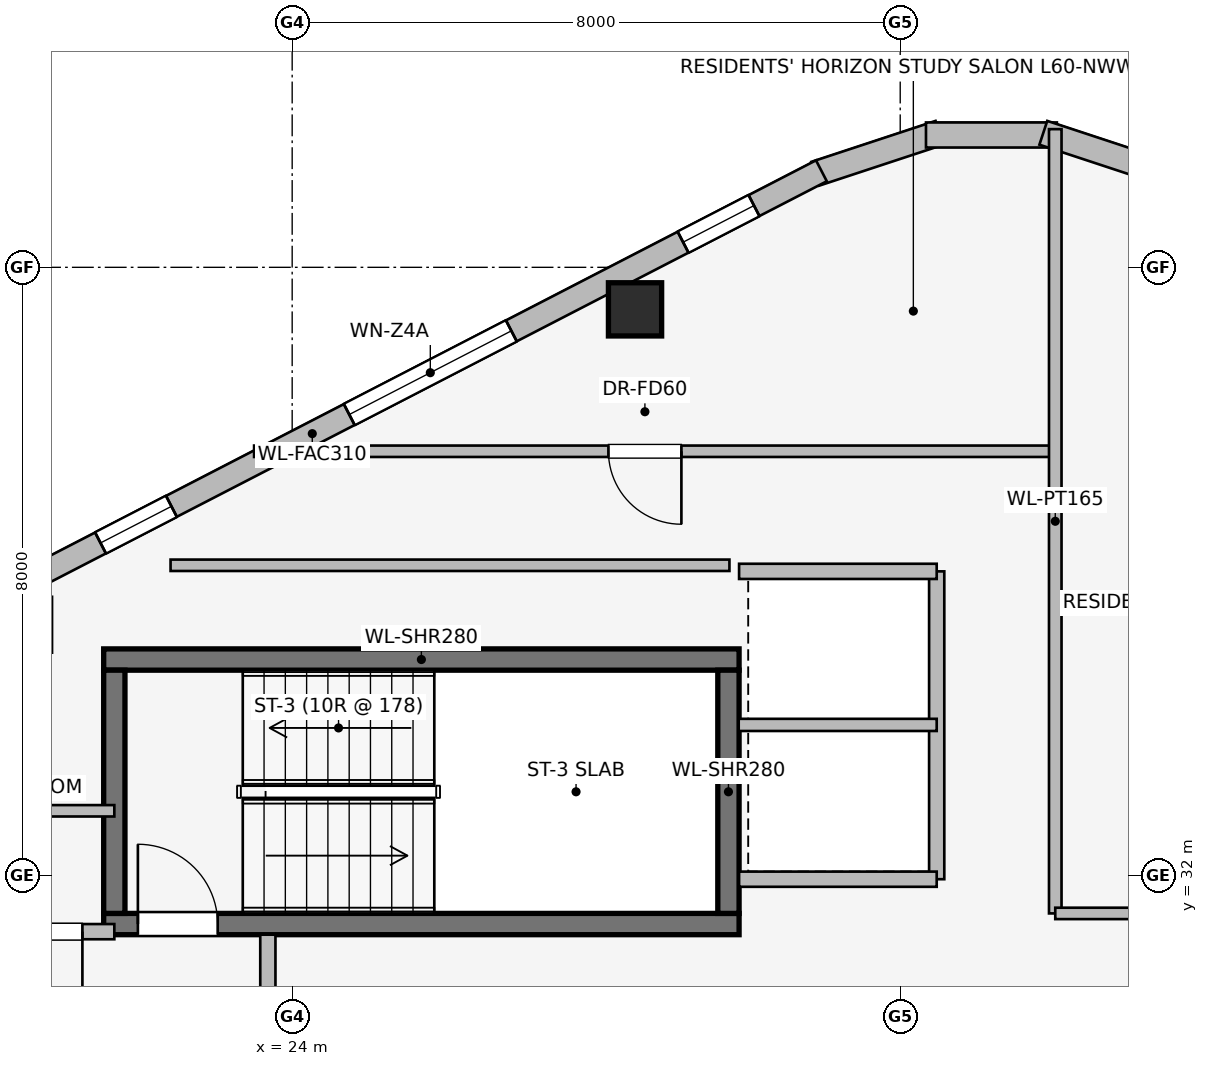
"""IFC4 building model, lengths in metres.
Left out: names, types, materials, properties, quantities, classifications, styles, units other than length and angle.
Written with IfcOpenShell. Run it as: python <this file> out.ifc"""

import sys

from ifc_helpers import new_model, si_unit, direction, frame, frame_2d, origin, origin_2d, place, context, subcontext, project, spatial, rectangle, extrude, element, fill, save


model = new_model("IFC4")
c1 = context("Model", 3, precision=1e-05, world=origin(), true_north=direction((0.0, 1.0)))
c2 = subcontext(c1, "Body", "Model", "MODEL_VIEW")
j1 = project(units=[si_unit("LENGTHUNIT", "METRE"), si_unit("PLANEANGLEUNIT", "RADIAN")], contexts=[c1])
p1 = place(None, origin())
s1 = spatial("IfcSite", under=j1, at=p1, CompositionType="ELEMENT")
p2 = place(p1, origin())
s2 = spatial("IfcBuilding", under=s1, at=p2, CompositionType="ELEMENT")
p3 = place(p2, frame((0.0, 0.0, 220.6)))
s3 = spatial("IfcBuildingStorey", under=s2, at=p3, CompositionType="ELEMENT", Elevation=220.6)
p4 = place(p3, frame((21.52, 31.36, 0.0), z_axis=(0.0, 0.0, 1.0), x_axis=(1.0, 0.0, 0.0)))
e1 = element("IfcWall", 1, at=p4, inside=s3, PredefinedType="SHEAR", context=c2, shape_type="SweptSolid", body=[
    extrude(rectangle(XDim=8.36, YDim=0.28, at=frame_2d((4.18, 0.0))), origin(), (0.0, 0.0, 1.0), 3.55),
])
p5 = place(p4, frame((0.45, 0.0, 0.0)))
e2 = element("IfcOpeningElement", 2, at=p5, cuts=e1, PredefinedType="OPENING", context=c2, shape_type="SweptSolid", body=[
    extrude(rectangle(XDim=1.05, YDim=2.0, at=frame_2d((0.525, 1.0))), frame((0.0, 0.15, 0.0), z_axis=(0.0, -1.0, 0.0), x_axis=(1.0, 0.0, 0.0)), (0.0, 0.0, 1.0), 0.3),
])
p6 = place(p3, frame((29.88, 34.84, 0.0), z_axis=(0.0, 0.0, 1.0), x_axis=(-1.0, 0.0, 0.0)))
e3 = element("IfcWall", 3, at=p6, inside=s3, PredefinedType="SHEAR", context=c2, shape_type="SweptSolid", body=[
    extrude(rectangle(XDim=8.36, YDim=0.28, at=frame_2d((4.18, 0.0))), origin(), (0.0, 0.0, 1.0), 3.55),
])
for number, where, z_axis, x_axis in (
    (4, (21.66, 34.7, 0.0), (0.0, 0.0, 1.0), (0.0, -1.0, 0.0)),
    (5, (29.74, 31.5, 0.0), (0.0, 0.0, 1.0), (0.0, 1.0, 0.0)),
):
    element("IfcWall", number, at=place(p3, frame(where, z_axis=z_axis, x_axis=x_axis)), inside=s3, PredefinedType="SHEAR", context=c2, shape_type="SweptSolid", body=[
        extrude(rectangle(XDim=3.2, YDim=0.28, at=frame_2d((1.6, 0.0))), origin(), (0.0, 0.0, 1.0), 3.55),
    ])
p7 = place(p3, frame((28.511, 39.447, 0.0), z_axis=(0.0, 0.0, 1.0), x_axis=(1.0, 0.0, 0.0)))
e6 = element("IfcColumn", 6, at=p7, inside=s3, PredefinedType="COLUMN", context=c2, shape_type="SweptSolid", body=[
    extrude(rectangle(XDim=0.7, YDim=0.7, at=origin_2d()), origin(), (0.0, 0.0, 1.0), 3.55),
])
p8 = place(p3, frame((30.882, 41.231, 0.0), z_axis=(0.0, 0.0, 1.0), x_axis=(0.949713440491, 0.313120393699, 0.0)))
e7 = element("IfcWall", 7, at=p8, inside=s3, PredefinedType="STANDARD", context=c2, shape_type="SweptSolid", body=[
    extrude(rectangle(XDim=1.722, YDim=0.33, at=frame_2d((0.861, 0.0))), origin(), (0.0, 0.0, 1.0), 3.29),
])
p9 = place(p3, frame((32.339, 41.741, 0.0), z_axis=(0.0, 0.0, 1.0), x_axis=(1.0, 0.0, 0.0)))
e8 = element("IfcWall", 8, at=p9, inside=s3, PredefinedType="STANDARD", context=c2, shape_type="SweptSolid", body=[
    extrude(rectangle(XDim=1.722, YDim=0.33, at=frame_2d((0.861, 0.0))), origin(), (0.0, 0.0, 1.0), 3.29),
])
p10 = place(p3, frame((33.883, 41.77, 0.0), z_axis=(0.0, 0.0, 1.0), x_axis=(0.949713440491, -0.313120393699, 0.0)))
e9 = element("IfcWall", 9, at=p10, inside=s3, PredefinedType="STANDARD", context=c2, shape_type="SweptSolid", body=[
    extrude(rectangle(XDim=1.722, YDim=0.33, at=frame_2d((0.861, 0.0))), origin(), (0.0, 0.0, 1.0), 3.29),
])
p11 = place(p3, frame((17.566, 34.354, 0.0), z_axis=(0.0, 0.0, 1.0), x_axis=(0.888581481622, 0.458718814218, 0.0)))
e10 = element("IfcWall", 10, at=p11, inside=s3, PredefinedType="STANDARD", context=c2, shape_type="SweptSolid", body=[
    extrude(rectangle(XDim=15.077, YDim=0.31, at=frame_2d((7.539, 0.0))), origin(), (0.0, 0.0, 1.0), 3.29),
])
p12 = place(p11, frame((0.998, 0.0, 0.75)))
e11 = element("IfcOpeningElement", 11, at=p12, cuts=e10, PredefinedType="OPENING", context=c2, shape_type="SweptSolid", body=[
    extrude(rectangle(XDim=1.05, YDim=1.4, at=frame_2d((0.525, 0.7))), frame((0.0, 0.165, 0.0), z_axis=(0.0, -1.0, 0.0), x_axis=(1.0, 0.0, 0.0)), (0.0, 0.0, 1.0), 0.33),
])
p13 = place(p11, frame((4.403, 0.0, 0.75)))
e12 = element("IfcOpeningElement", 12, at=p13, cuts=e10, PredefinedType="OPENING", context=c2, shape_type="SweptSolid", body=[
    extrude(rectangle(XDim=1.05, YDim=1.4, at=frame_2d((0.525, 0.7))), frame((0.0, 0.165, 0.0), z_axis=(0.0, -1.0, 0.0), x_axis=(1.0, 0.0, 0.0)), (0.0, 0.0, 1.0), 0.33),
])
p14 = place(p11, frame((8.086, 0.0, 0.75)))
e13 = element("IfcOpeningElement", 13, at=p14, cuts=e10, PredefinedType="OPENING", context=c2, shape_type="SweptSolid", body=[
    extrude(rectangle(XDim=2.4, YDim=1.6, at=frame_2d((1.2, 0.8))), frame((0.0, 0.165, 0.0), z_axis=(0.0, -1.0, 0.0), x_axis=(1.0, 0.0, 0.0)), (0.0, 0.0, 1.0), 0.33),
])
p15 = place(p11, frame((13.029, 0.0, 0.75)))
e14 = element("IfcOpeningElement", 14, at=p15, cuts=e10, PredefinedType="OPENING", context=c2, shape_type="SweptSolid", body=[
    extrude(rectangle(XDim=1.05, YDim=1.4, at=frame_2d((0.525, 0.7))), frame((0.0, 0.165, 0.0), z_axis=(0.0, -1.0, 0.0), x_axis=(1.0, 0.0, 0.0)), (0.0, 0.0, 1.0), 0.33),
])
p16 = place(p3, frame((23.68, 25.68, 0.0), z_axis=(0.0, 0.0, 1.0), x_axis=(0.0, 1.0, 0.0)))
e15 = element("IfcWall", 15, at=p16, inside=s3, PredefinedType="PARTITIONING", context=c2, shape_type="SweptSolid", body=[
    extrude(rectangle(XDim=5.54, YDim=0.2, at=frame_2d((2.77, 0.0))), origin(), (0.0, 0.0, 1.0), 3.29),
])
p17 = place(p16, frame((1.8, 0.0, 0.0)))
e16 = element("IfcOpeningElement", 16, at=p17, cuts=e15, PredefinedType="OPENING", context=c2, shape_type="SweptSolid", body=[
    extrude(rectangle(XDim=1.05, YDim=2.0, at=frame_2d((0.525, 1.0))), frame((0.0, 0.11, 0.0), z_axis=(0.0, -1.0, 0.0), x_axis=(1.0, 0.0, 0.0)), (0.0, 0.0, 1.0), 0.22),
])
p18 = place(p3, frame((21.66, 31.26, 0.0), z_axis=(0.0, 0.0, 1.0), x_axis=(-1.0, 0.0, 0.0)))
e17 = element("IfcWall", 17, at=p18, inside=s3, PredefinedType="PARTITIONING", context=c2, shape_type="SweptSolid", body=[
    extrude(rectangle(XDim=2.01, YDim=0.2, at=frame_2d((1.005, 0.0))), origin(), (0.0, 0.0, 1.0), 3.29),
])
p19 = place(p18, frame((0.42, 0.0, 0.0)))
e18 = element("IfcOpeningElement", 18, at=p19, cuts=e17, PredefinedType="OPENING", context=c2, shape_type="SweptSolid", body=[
    extrude(rectangle(XDim=0.86, YDim=2.0, at=frame_2d((0.43, 1.0))), frame((0.0, 0.11, 0.0), z_axis=(0.0, -1.0, 0.0), x_axis=(1.0, 0.0, 0.0)), (0.0, 0.0, 1.0), 0.22),
])
p20 = place(p3, frame((32.48, 31.95, 0.0), z_axis=(0.0, 0.0, 1.0), x_axis=(0.0, 1.0, 0.0)))
e19 = element("IfcWall", 19, at=p20, inside=s3, PredefinedType="PARTITIONING", context=c2, shape_type="SweptSolid", body=[
    extrude(rectangle(XDim=4.05, YDim=0.2, at=frame_2d((2.025, 0.0))), origin(), (0.0, 0.0, 1.0), 3.29),
])
p21 = place(p3, frame((29.88, 36.0, 0.0), z_axis=(0.0, 0.0, 1.0), x_axis=(1.0, 0.0, 0.0)))
e20 = element("IfcWall", 20, at=p21, inside=s3, PredefinedType="PARTITIONING", context=c2, shape_type="SweptSolid", body=[
    extrude(rectangle(XDim=2.6, YDim=0.2, at=frame_2d((1.3, 0.0))), origin(), (0.0, 0.0, 1.0), 3.29),
])
p22 = place(p3, frame((32.48, 31.95, 0.0), z_axis=(0.0, 0.0, 1.0), x_axis=(-1.0, 0.0, 0.0)))
e21 = element("IfcWall", 21, at=p22, inside=s3, PredefinedType="PARTITIONING", context=c2, shape_type="SweptSolid", body=[
    extrude(rectangle(XDim=2.6, YDim=0.2, at=frame_2d((1.3, 0.0))), origin(), (0.0, 0.0, 1.0), 2.682),
])
p23 = place(p3, frame((29.875, 33.98, 0.0), z_axis=(0.0, 0.0, 1.0), x_axis=(1.0, 0.0, 0.0)))
e22 = element("IfcWall", 22, at=p23, inside=s3, PredefinedType="PARTITIONING", context=c2, shape_type="SweptSolid", body=[
    extrude(rectangle(XDim=2.605, YDim=0.16, at=frame_2d((1.302, 0.0))), origin(), (0.0, 0.0, 1.0), 3.29),
])
p24 = place(p3, frame((21.66, 32.85, 0.0), z_axis=(0.0, 0.0, 1.0), x_axis=(-1.0, 0.0, 0.0)))
e23 = element("IfcWall", 23, at=p24, inside=s3, PredefinedType="PARTITIONING", context=c2, shape_type="SweptSolid", body=[
    extrude(rectangle(XDim=1.71, YDim=0.15, at=frame_2d((0.855, 0.0))), origin(), (0.0, 0.0, 1.0), 3.29),
])
p25 = place(p3, frame((34.0, 37.58, 0.0), z_axis=(0.0, 0.0, 1.0), x_axis=(-1.0, 0.0, 0.0)))
e24 = element("IfcWall", 24, at=p25, inside=s3, PredefinedType="PARTITIONING", context=c2, shape_type="SweptSolid", body=[
    extrude(rectangle(XDim=10.501, YDim=0.15, at=frame_2d((5.25, 0.0))), origin(), (0.0, 0.0, 1.0), 3.29),
])
p26 = place(p25, frame((4.879, 0.0, 0.0)))
e25 = element("IfcOpeningElement", 25, at=p26, cuts=e24, PredefinedType="OPENING", context=c2, shape_type="SweptSolid", body=[
    extrude(rectangle(XDim=0.96, YDim=2.0, at=frame_2d((0.48, 1.0))), frame((0.0, 0.085, 0.0), z_axis=(0.0, -1.0, 0.0), x_axis=(1.0, 0.0, 0.0)), (0.0, 0.0, 1.0), 0.17),
])
p27 = place(p3, frame((34.04, 31.5, 0.0), z_axis=(0.0, 0.0, 1.0), x_axis=(0.0, 1.0, 0.0)))
e26 = element("IfcWall", 26, at=p27, inside=s3, PredefinedType="PARTITIONING", context=c2, shape_type="SweptSolid", body=[
    extrude(rectangle(XDim=10.318, YDim=0.165, at=frame_2d((5.159, 0.0))), origin(), (0.0, 0.0, 1.0), 3.29),
])
p28 = place(p3, frame((41.46, 31.5, 0.0), z_axis=(0.0, 0.0, 1.0), x_axis=(-1.0, 0.0, 0.0)))
e27 = element("IfcWall", 27, at=p28, inside=s3, PredefinedType="PARTITIONING", context=c2, shape_type="SweptSolid", body=[
    extrude(rectangle(XDim=7.42, YDim=0.15, at=frame_2d((3.71, 0.0))), origin(), (0.0, 0.0, 1.0), 3.29),
])
p29 = place(p28, frame((3.23, 0.0, 0.0)))
e28 = element("IfcOpeningElement", 28, at=p29, cuts=e27, PredefinedType="OPENING", context=c2, shape_type="SweptSolid", body=[
    extrude(rectangle(XDim=0.96, YDim=2.0, at=frame_2d((0.48, 1.0))), frame((0.0, 0.085, 0.0), z_axis=(0.0, -1.0, 0.0), x_axis=(1.0, 0.0, 0.0)), (0.0, 0.0, 1.0), 0.17),
])
p30 = place(p3, frame((29.753, 36.08, 0.0), z_axis=(0.0, 0.0, 1.0), x_axis=(-1.0, 0.0, 0.0)))
e29 = element("IfcWall", 29, at=p30, inside=s3, PredefinedType="PARTITIONING", context=c2, shape_type="SweptSolid", body=[
    extrude(rectangle(XDim=7.353, YDim=0.15, at=frame_2d((3.677, 0.0))), origin(), (0.0, 0.0, 1.0), 3.29),
])
p31 = place(p13, origin())
e30 = element("IfcWindow", 30, at=p31, inside=s3, PartitioningType="SINGLE_PANEL", PredefinedType="WINDOW", context=c2, shape_type="SweptSolid", body=[
    extrude(rectangle(XDim=1.05, YDim=1.4, at=frame_2d((0.525, 0.7))), frame((0.0, 0.03, 0.0), z_axis=(0.0, -1.0, 0.0), x_axis=(1.0, 0.0, 0.0)), (0.0, 0.0, 1.0), 0.06),
])
fill(e12, e30)
p32 = place(p14, origin())
e31 = element("IfcWindow", 31, at=p32, inside=s3, PartitioningType="SINGLE_PANEL", PredefinedType="WINDOW", context=c2, shape_type="SweptSolid", body=[
    extrude(rectangle(XDim=2.4, YDim=1.6, at=frame_2d((1.2, 0.8))), frame((0.0, 0.03, 0.0), z_axis=(0.0, -1.0, 0.0), x_axis=(1.0, 0.0, 0.0)), (0.0, 0.0, 1.0), 0.06),
])
fill(e13, e31)
p33 = place(p15, origin())
e32 = element("IfcWindow", 32, at=p33, inside=s3, PartitioningType="SINGLE_PANEL", PredefinedType="WINDOW", context=c2, shape_type="SweptSolid", body=[
    extrude(rectangle(XDim=1.05, YDim=1.4, at=frame_2d((0.525, 0.7))), frame((0.0, 0.03, 0.0), z_axis=(0.0, -1.0, 0.0), x_axis=(1.0, 0.0, 0.0)), (0.0, 0.0, 1.0), 0.06),
])
fill(e14, e32)
p34 = place(p5, origin())
e33 = element("IfcDoor", 33, at=p34, inside=s3, OperationType="SINGLE_SWING_LEFT", PredefinedType="DOOR", context=c2, shape_type="SweptSolid", body=[
    extrude(rectangle(XDim=1.05, YDim=2.0, at=frame_2d((0.525, 1.0))), frame((0.0, 0.025, 0.0), z_axis=(0.0, -1.0, 0.0), x_axis=(1.0, 0.0, 0.0)), (0.0, 0.0, 1.0), 0.05),
])
fill(e2, e33)
p35 = place(p19, origin())
e34 = element("IfcDoor", 34, at=p35, inside=s3, OperationType="SINGLE_SWING_LEFT", PredefinedType="DOOR", context=c2, shape_type="SweptSolid", body=[
    extrude(rectangle(XDim=0.86, YDim=2.0, at=frame_2d((0.43, 1.0))), frame((0.0, 0.025, 0.0), z_axis=(0.0, -1.0, 0.0), x_axis=(1.0, 0.0, 0.0)), (0.0, 0.0, 1.0), 0.05),
])
fill(e18, e34)
p36 = place(p26, origin())
e35 = element("IfcDoor", 35, at=p36, inside=s3, OperationType="SINGLE_SWING_LEFT", PredefinedType="DOOR", context=c2, shape_type="SweptSolid", body=[
    extrude(rectangle(XDim=0.96, YDim=2.0, at=frame_2d((0.48, 1.0))), frame((0.0, 0.025, 0.0), z_axis=(0.0, -1.0, 0.0), x_axis=(1.0, 0.0, 0.0)), (0.0, 0.0, 1.0), 0.05),
])
fill(e25, e35)
save(model, sys.argv[1])
